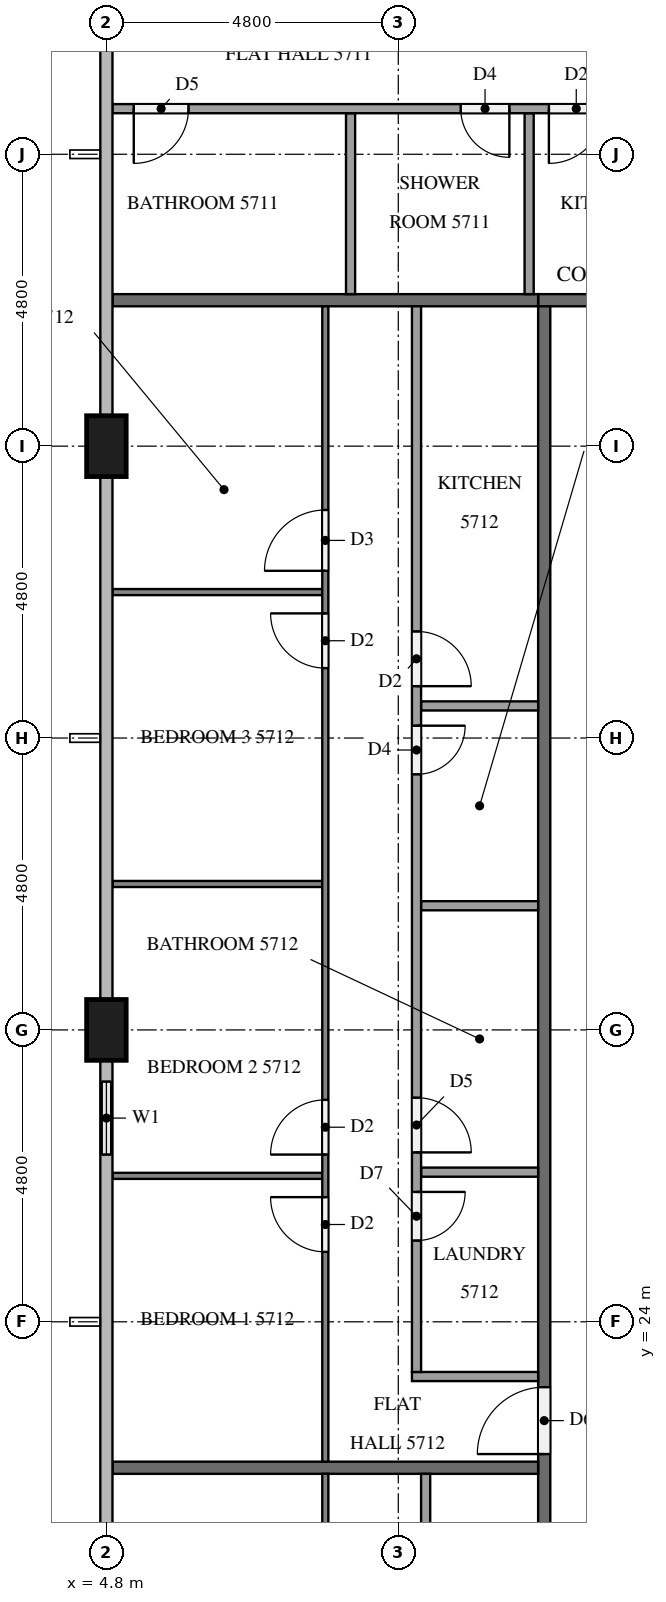
"""IFC4 building model, lengths in metres.
Left out: names, types, materials, properties, quantities, classifications, styles, units other than length and angle.
Written with IfcOpenShell. Run it as: python <this file> out.ifc"""

import sys

from ifc_helpers import new_model, si_unit, direction, frame, frame_2d, origin, origin_2d, place, context, subcontext, project, spatial, rectangle, extrude, element, fill, save


model = new_model("IFC4")
c1 = context("Model", 3, precision=1e-05, world=origin(), true_north=direction((0.0, 1.0)))
c2 = subcontext(c1, "Body", "Model", "MODEL_VIEW")
j1 = project(units=[si_unit("LENGTHUNIT", "METRE"), si_unit("PLANEANGLEUNIT", "RADIAN")], contexts=[c1])
p1 = place(None, origin())
s1 = spatial("IfcSite", under=j1, at=p1, CompositionType="ELEMENT")
p2 = place(p1, origin())
s2 = spatial("IfcBuilding", under=s1, at=p2, CompositionType="ELEMENT")
p3 = place(p2, frame((0.0, 0.0, 219.3)))
s3 = spatial("IfcBuildingStorey", under=s2, at=p3, CompositionType="ELEMENT", Elevation=219.3)
for number, where, z_axis, x_axis in (
    (1, (4.8, 38.4, 0.0), (0.0, 0.0, 1.0), (0.0, 1.0, 0.0)),
    (2, (4.8, 28.8, 0.0), (0.0, 0.0, 1.0), (0.0, 1.0, 0.0)),
):
    element("IfcColumn", number, at=place(p3, frame(where, z_axis=z_axis, x_axis=x_axis)), inside=s3, PredefinedType="COLUMN", context=c2, shape_type="SweptSolid", body=[
        extrude(rectangle(XDim=1.0, YDim=0.65, at=origin_2d()), origin(), (0.0, 0.0, 1.0), 3.2),
    ])
p4 = place(p3, frame((4.8, 28.3, 0.0), z_axis=(0.0, 0.0, 1.0), x_axis=(0.0, -1.0, 0.0)))
e3 = element("IfcWall", 3, at=p4, inside=s3, PredefinedType="SOLIDWALL", context=c2, shape_type="SweptSolid", body=[
    extrude(rectangle(XDim=1.9, YDim=0.15, at=frame_2d((0.95, 0.0))), origin(), (0.0, 0.0, 1.0), 3.2),
])
p5 = place(p4, frame((0.35, 0.0, 0.9)))
e4 = element("IfcOpeningElement", 4, at=p5, cuts=e3, PredefinedType="OPENING", context=c2, shape_type="SweptSolid", body=[
    extrude(rectangle(XDim=1.2, YDim=1.4, at=frame_2d((0.6, 0.7))), frame((0.0, 0.085, 0.0), z_axis=(0.0, -1.0, 0.0), x_axis=(1.0, 0.0, 0.0)), (0.0, 0.0, 1.0), 0.17),
])
p6 = place(p3, frame((11.9, 40.8, 0.0), z_axis=(0.0, 0.0, 1.0), x_axis=(1.0, 0.0, 0.0)))
e5 = element("IfcWall", 5, at=p6, inside=s3, PredefinedType="PARTITIONING", context=c2, shape_type="SweptSolid", body=[
    extrude(rectangle(XDim=38.6, YDim=0.2, at=frame_2d((19.3, 0.0))), origin(), (0.0, 0.0, 1.0), 3.2),
])
p7 = place(p6, frame((33.975, 0.0, 0.0)))
e6 = element("IfcOpeningElement", 6, at=p7, cuts=e5, PredefinedType="OPENING", context=c2, shape_type="SweptSolid", body=[
    extrude(rectangle(XDim=1.0, YDim=2.1, at=frame_2d((0.5, 1.05))), frame((0.0, 0.11, 0.0), z_axis=(0.0, -1.0, 0.0), x_axis=(1.0, 0.0, 0.0)), (0.0, 0.0, 1.0), 0.22),
])
p8 = place(p6, frame((14.725, 0.0, 0.0)))
e7 = element("IfcOpeningElement", 7, at=p8, cuts=e5, PredefinedType="OPENING", context=c2, shape_type="SweptSolid", body=[
    extrude(rectangle(XDim=1.1, YDim=2.1, at=frame_2d((0.55, 1.05))), frame((0.0, 0.11, 0.0), z_axis=(0.0, -1.0, 0.0), x_axis=(1.0, 0.0, 0.0)), (0.0, 0.0, 1.0), 0.22),
])
p9 = place(p6, frame((7.575, 0.0, 0.0)))
e8 = element("IfcOpeningElement", 8, at=p9, cuts=e5, PredefinedType="OPENING", context=c2, shape_type="SweptSolid", body=[
    extrude(rectangle(XDim=1.0, YDim=2.1, at=frame_2d((0.5, 1.05))), frame((0.0, 0.11, 0.0), z_axis=(0.0, -1.0, 0.0), x_axis=(1.0, 0.0, 0.0)), (0.0, 0.0, 1.0), 0.22),
])
p10 = place(p6, frame((6.025, 0.0, 0.0)))
e9 = element("IfcOpeningElement", 9, at=p10, cuts=e5, PredefinedType="OPENING", context=c2, shape_type="SweptSolid", body=[
    extrude(rectangle(XDim=1.0, YDim=2.1, at=frame_2d((0.5, 1.05))), frame((0.0, 0.11, 0.0), z_axis=(0.0, -1.0, 0.0), x_axis=(1.0, 0.0, 0.0)), (0.0, 0.0, 1.0), 0.22),
])
p11 = place(p3, frame((12.0, 12.1, 0.0), z_axis=(0.0, 0.0, 1.0), x_axis=(0.0, 1.0, 0.0)))
e10 = element("IfcWall", 10, at=p11, inside=s3, PredefinedType="PARTITIONING", context=c2, shape_type="SweptSolid", body=[
    extrude(rectangle(XDim=28.6, YDim=0.2, at=frame_2d((14.3, 0.0))), origin(), (0.0, 0.0, 1.0), 3.2),
])
p12 = place(p11, frame((9.725, 0.0, 0.0)))
e11 = element("IfcOpeningElement", 11, at=p12, cuts=e10, PredefinedType="OPENING", context=c2, shape_type="SweptSolid", body=[
    extrude(rectangle(XDim=1.1, YDim=2.1, at=frame_2d((0.55, 1.05))), frame((0.0, 0.11, 0.0), z_axis=(0.0, -1.0, 0.0), x_axis=(1.0, 0.0, 0.0)), (0.0, 0.0, 1.0), 0.22),
])
p13 = place(p11, frame((0.175, 0.0, 0.0)))
e12 = element("IfcOpeningElement", 12, at=p13, cuts=e10, PredefinedType="OPENING", context=c2, shape_type="SweptSolid", body=[
    extrude(rectangle(XDim=1.0, YDim=2.1, at=frame_2d((0.5, 1.05))), frame((0.0, 0.11, 0.0), z_axis=(0.0, -1.0, 0.0), x_axis=(1.0, 0.0, 0.0)), (0.0, 0.0, 1.0), 0.22),
])
for number, where, z_axis, x_axis in (
    (13, (4.9, 40.8, 0.0), (0.0, 0.0, 1.0), (1.0, 0.0, 0.0)),
    (14, (4.9, 21.6, 0.0), (0.0, 0.0, 1.0), (1.0, 0.0, 0.0)),
):
    element("IfcWall", number, at=place(p3, frame(where, z_axis=z_axis, x_axis=x_axis)), inside=s3, PredefinedType="PARTITIONING", context=c2, shape_type="SweptSolid", body=[
        extrude(rectangle(XDim=7.0, YDim=0.2, at=frame_2d((3.5, 0.0))), origin(), (0.0, 0.0, 1.0), 3.2),
    ])
for number, where, z_axis, x_axis in (
    (15, (11.752, 40.9, 0.0), (0.0, 0.0, 1.0), (0.0, 1.0, 0.0)),
    (16, (8.815, 40.9, 0.0), (0.0, 0.0, 1.0), (0.0, 1.0, 0.0)),
):
    element("IfcWall", number, at=place(p3, frame(where, z_axis=z_axis, x_axis=x_axis)), inside=s3, PredefinedType="PARTITIONING", context=c2, shape_type="SweptSolid", body=[
        extrude(rectangle(XDim=2.975, YDim=0.15, at=frame_2d((1.488, 0.0))), origin(), (0.0, 0.0, 1.0), 3.2),
    ])
p14 = place(p3, frame((17.625, 43.95, 0.0), z_axis=(0.0, 0.0, 1.0), x_axis=(-1.0, 0.0, 0.0)))
e17 = element("IfcWall", 17, at=p14, inside=s3, PredefinedType="PARTITIONING", context=c2, shape_type="SweptSolid", body=[
    extrude(rectangle(XDim=12.725, YDim=0.15, at=frame_2d((6.363, 0.0))), origin(), (0.0, 0.0, 1.0), 3.2),
])
p15 = place(p14, frame((4.648, 0.0, 0.0)))
e18 = element("IfcOpeningElement", 18, at=p15, cuts=e17, PredefinedType="OPENING", context=c2, shape_type="SweptSolid", body=[
    extrude(rectangle(XDim=0.9, YDim=2.1, at=frame_2d((0.45, 1.05))), frame((0.0, 0.085, 0.0), z_axis=(0.0, -1.0, 0.0), x_axis=(1.0, 0.0, 0.0)), (0.0, 0.0, 1.0), 0.17),
])
p16 = place(p14, frame((6.198, 0.0, 0.0)))
e19 = element("IfcOpeningElement", 19, at=p16, cuts=e17, PredefinedType="OPENING", context=c2, shape_type="SweptSolid", body=[
    extrude(rectangle(XDim=0.8, YDim=2.1, at=frame_2d((0.4, 1.05))), frame((0.0, 0.085, 0.0), z_axis=(0.0, -1.0, 0.0), x_axis=(1.0, 0.0, 0.0)), (0.0, 0.0, 1.0), 0.17),
])
p17 = place(p14, frame((11.475, 0.0, 0.0)))
e20 = element("IfcOpeningElement", 20, at=p17, cuts=e17, PredefinedType="OPENING", context=c2, shape_type="SweptSolid", body=[
    extrude(rectangle(XDim=0.9, YDim=2.1, at=frame_2d((0.45, 1.05))), frame((0.0, 0.085, 0.0), z_axis=(0.0, -1.0, 0.0), x_axis=(1.0, 0.0, 0.0)), (0.0, 0.0, 1.0), 0.17),
])
for number, where, z_axis, x_axis in (
    (21, (8.35, 26.4, 0.0), (0.0, 0.0, 1.0), (-1.0, 0.0, 0.0)),
    (22, (8.35, 31.2, 0.0), (0.0, 0.0, 1.0), (-1.0, 0.0, 0.0)),
    (23, (8.35, 36.0, 0.0), (0.0, 0.0, 1.0), (-1.0, 0.0, 0.0)),
):
    element("IfcWall", number, at=place(p3, frame(where, z_axis=z_axis, x_axis=x_axis)), inside=s3, PredefinedType="PARTITIONING", context=c2, shape_type="SweptSolid", body=[
        extrude(rectangle(XDim=3.45, YDim=0.1, at=frame_2d((1.725, 0.0))), origin(), (0.0, 0.0, 1.0), 3.2),
    ])
p18 = place(p3, frame((8.4, 21.7, 0.0), z_axis=(0.0, 0.0, 1.0), x_axis=(0.0, 1.0, 0.0)))
e24 = element("IfcWall", 24, at=p18, inside=s3, PredefinedType="PARTITIONING", context=c2, shape_type="SweptSolid", body=[
    extrude(rectangle(XDim=19.0, YDim=0.1, at=frame_2d((9.5, 0.0))), origin(), (0.0, 0.0, 1.0), 3.2),
])
p19 = place(p18, frame((3.45, 0.0, 0.0)))
e25 = element("IfcOpeningElement", 25, at=p19, cuts=e24, PredefinedType="OPENING", context=c2, shape_type="SweptSolid", body=[
    extrude(rectangle(XDim=0.9, YDim=2.1, at=frame_2d((0.45, 1.05))), frame((0.0, 0.06, 0.0), z_axis=(0.0, -1.0, 0.0), x_axis=(1.0, 0.0, 0.0)), (0.0, 0.0, 1.0), 0.12),
])
p20 = place(p18, frame((5.05, 0.0, 0.0)))
e26 = element("IfcOpeningElement", 26, at=p20, cuts=e24, PredefinedType="OPENING", context=c2, shape_type="SweptSolid", body=[
    extrude(rectangle(XDim=0.9, YDim=2.1, at=frame_2d((0.45, 1.05))), frame((0.0, 0.06, 0.0), z_axis=(0.0, -1.0, 0.0), x_axis=(1.0, 0.0, 0.0)), (0.0, 0.0, 1.0), 0.12),
])
p21 = place(p18, frame((13.05, 0.0, 0.0)))
e27 = element("IfcOpeningElement", 27, at=p21, cuts=e24, PredefinedType="OPENING", context=c2, shape_type="SweptSolid", body=[
    extrude(rectangle(XDim=0.9, YDim=2.1, at=frame_2d((0.45, 1.05))), frame((0.0, 0.06, 0.0), z_axis=(0.0, -1.0, 0.0), x_axis=(1.0, 0.0, 0.0)), (0.0, 0.0, 1.0), 0.12),
])
p22 = place(p18, frame((14.65, 0.0, 0.0)))
e28 = element("IfcOpeningElement", 28, at=p22, cuts=e24, PredefinedType="OPENING", context=c2, shape_type="SweptSolid", body=[
    extrude(rectangle(XDim=1.0, YDim=2.1, at=frame_2d((0.5, 1.05))), frame((0.0, 0.06, 0.0), z_axis=(0.0, -1.0, 0.0), x_axis=(1.0, 0.0, 0.0)), (0.0, 0.0, 1.0), 0.12),
])
for number, where, z_axis, x_axis in (
    (29, (11.9, 26.461, 0.0), (0.0, 0.0, 1.0), (-1.0, 0.0, 0.0)),
    (30, (11.9, 30.842, 0.0), (0.0, 0.0, 1.0), (-1.0, 0.0, 0.0)),
    (31, (11.9, 34.128, 0.0), (0.0, 0.0, 1.0), (-1.0, 0.0, 0.0)),
):
    element("IfcWall", number, at=place(p3, frame(where, z_axis=z_axis, x_axis=x_axis)), inside=s3, PredefinedType="PARTITIONING", context=c2, shape_type="SweptSolid", body=[
        extrude(rectangle(XDim=1.925, YDim=0.15, at=frame_2d((0.962, 0.0))), origin(), (0.0, 0.0, 1.0), 3.2),
    ])
p23 = place(p3, frame((11.9, 23.1, 0.0), z_axis=(0.0, 0.0, 1.0), x_axis=(-1.0, 0.0, 0.0)))
e32 = element("IfcWall", 32, at=p23, inside=s3, PredefinedType="PARTITIONING", context=c2, shape_type="SweptSolid", body=[
    extrude(rectangle(XDim=2.075, YDim=0.15, at=frame_2d((1.038, 0.0))), origin(), (0.0, 0.0, 1.0), 3.2),
])
p24 = place(p3, frame((9.9, 40.7, 0.0), z_axis=(0.0, 0.0, 1.0), x_axis=(0.0, -1.0, 0.0)))
e33 = element("IfcWall", 33, at=p24, inside=s3, PredefinedType="PARTITIONING", context=c2, shape_type="SweptSolid", body=[
    extrude(rectangle(XDim=17.525, YDim=0.15, at=frame_2d((8.762, 0.0))), origin(), (0.0, 0.0, 1.0), 3.2),
])
p25 = place(p24, frame((14.564, 0.0, 0.0)))
e34 = element("IfcOpeningElement", 34, at=p25, cuts=e33, PredefinedType="OPENING", context=c2, shape_type="SweptSolid", body=[
    extrude(rectangle(XDim=0.8, YDim=2.1, at=frame_2d((0.4, 1.05))), frame((0.0, 0.085, 0.0), z_axis=(0.0, -1.0, 0.0), x_axis=(1.0, 0.0, 0.0)), (0.0, 0.0, 1.0), 0.17),
])
p26 = place(p24, frame((13.014, 0.0, 0.0)))
e35 = element("IfcOpeningElement", 35, at=p26, cuts=e33, PredefinedType="OPENING", context=c2, shape_type="SweptSolid", body=[
    extrude(rectangle(XDim=0.9, YDim=2.1, at=frame_2d((0.45, 1.05))), frame((0.0, 0.085, 0.0), z_axis=(0.0, -1.0, 0.0), x_axis=(1.0, 0.0, 0.0)), (0.0, 0.0, 1.0), 0.17),
])
p27 = place(p24, frame((6.897, 0.0, 0.0)))
e36 = element("IfcOpeningElement", 36, at=p27, cuts=e33, PredefinedType="OPENING", context=c2, shape_type="SweptSolid", body=[
    extrude(rectangle(XDim=0.8, YDim=2.1, at=frame_2d((0.4, 1.05))), frame((0.0, 0.085, 0.0), z_axis=(0.0, -1.0, 0.0), x_axis=(1.0, 0.0, 0.0)), (0.0, 0.0, 1.0), 0.17),
])
p28 = place(p24, frame((5.347, 0.0, 0.0)))
e37 = element("IfcOpeningElement", 37, at=p28, cuts=e33, PredefinedType="OPENING", context=c2, shape_type="SweptSolid", body=[
    extrude(rectangle(XDim=0.9, YDim=2.1, at=frame_2d((0.45, 1.05))), frame((0.0, 0.085, 0.0), z_axis=(0.0, -1.0, 0.0), x_axis=(1.0, 0.0, 0.0)), (0.0, 0.0, 1.0), 0.17),
])
p29 = place(p3, frame((8.4, 12.1, 0.0), z_axis=(0.0, 0.0, 1.0), x_axis=(0.0, 1.0, 0.0)))
e38 = element("IfcWall", 38, at=p29, inside=s3, PredefinedType="PARTITIONING", context=c2, shape_type="SweptSolid", body=[
    extrude(rectangle(XDim=9.4, YDim=0.1, at=frame_2d((4.7, 0.0))), origin(), (0.0, 0.0, 1.0), 3.2),
])
p30 = place(p29, frame((3.35, 0.0, 0.0)))
e39 = element("IfcOpeningElement", 39, at=p30, cuts=e38, PredefinedType="OPENING", context=c2, shape_type="SweptSolid", body=[
    extrude(rectangle(XDim=1.0, YDim=2.1, at=frame_2d((0.5, 1.05))), frame((0.0, 0.06, 0.0), z_axis=(0.0, -1.0, 0.0), x_axis=(1.0, 0.0, 0.0)), (0.0, 0.0, 1.0), 0.12),
])
p31 = place(p29, frame((5.05, 0.0, 0.0)))
e40 = element("IfcOpeningElement", 40, at=p31, cuts=e38, PredefinedType="OPENING", context=c2, shape_type="SweptSolid", body=[
    extrude(rectangle(XDim=0.9, YDim=2.1, at=frame_2d((0.45, 1.05))), frame((0.0, 0.06, 0.0), z_axis=(0.0, -1.0, 0.0), x_axis=(1.0, 0.0, 0.0)), (0.0, 0.0, 1.0), 0.12),
])
p32 = place(p3, frame((10.05, 21.5, 0.0), z_axis=(0.0, 0.0, 1.0), x_axis=(0.0, -1.0, 0.0)))
e41 = element("IfcWall", 41, at=p32, inside=s3, PredefinedType="PARTITIONING", context=c2, shape_type="SweptSolid", body=[
    extrude(rectangle(XDim=7.925, YDim=0.15, at=frame_2d((3.962, 0.0))), origin(), (0.0, 0.0, 1.0), 3.2),
])
p33 = place(p32, frame((5.08, 0.0, 0.0)))
e42 = element("IfcOpeningElement", 42, at=p33, cuts=e41, PredefinedType="OPENING", context=c2, shape_type="SweptSolid", body=[
    extrude(rectangle(XDim=0.8, YDim=2.1, at=frame_2d((0.4, 1.05))), frame((0.0, 0.085, 0.0), z_axis=(0.0, -1.0, 0.0), x_axis=(1.0, 0.0, 0.0)), (0.0, 0.0, 1.0), 0.17),
])
p34 = place(p32, frame((3.53, 0.0, 0.0)))
e43 = element("IfcOpeningElement", 43, at=p34, cuts=e41, PredefinedType="OPENING", context=c2, shape_type="SweptSolid", body=[
    extrude(rectangle(XDim=0.9, YDim=2.1, at=frame_2d((0.45, 1.05))), frame((0.0, 0.085, 0.0), z_axis=(0.0, -1.0, 0.0), x_axis=(1.0, 0.0, 0.0)), (0.0, 0.0, 1.0), 0.17),
])
p35 = place(p5, origin())
e44 = element("IfcWindow", 44, at=p35, inside=s3, PartitioningType="SINGLE_PANEL", PredefinedType="WINDOW", context=c2, shape_type="SweptSolid", body=[
    extrude(rectangle(XDim=1.2, YDim=1.4, at=frame_2d((0.6, 0.7))), frame((0.0, 0.03, 0.0), z_axis=(0.0, -1.0, 0.0), x_axis=(1.0, 0.0, 0.0)), (0.0, 0.0, 1.0), 0.06),
])
fill(e4, e44)
p36 = place(p12, origin())
e45 = element("IfcDoor", 45, at=p36, inside=s3, OperationType="SINGLE_SWING_LEFT", PredefinedType="DOOR", context=c2, shape_type="SweptSolid", body=[
    extrude(rectangle(XDim=1.1, YDim=2.1, at=frame_2d((0.55, 1.05))), frame((0.0, 0.025, 0.0), z_axis=(0.0, -1.0, 0.0), x_axis=(1.0, 0.0, 0.0)), (0.0, 0.0, 1.0), 0.05),
])
fill(e11, e45)
p37 = place(p15, origin())
e46 = element("IfcDoor", 46, at=p37, inside=s3, OperationType="SINGLE_SWING_RIGHT", PredefinedType="DOOR", context=c2, shape_type="SweptSolid", body=[
    extrude(rectangle(XDim=0.9, YDim=2.1, at=frame_2d((0.45, 1.05))), frame((0.0, 0.025, 0.0), z_axis=(0.0, -1.0, 0.0), x_axis=(1.0, 0.0, 0.0)), (0.0, 0.0, 1.0), 0.05),
])
fill(e18, e46)
p38 = place(p16, origin())
e47 = element("IfcDoor", 47, at=p38, inside=s3, OperationType="SINGLE_SWING_LEFT", PredefinedType="DOOR", context=c2, shape_type="SweptSolid", body=[
    extrude(rectangle(XDim=0.8, YDim=2.1, at=frame_2d((0.4, 1.05))), frame((0.0, 0.025, 0.0), z_axis=(0.0, -1.0, 0.0), x_axis=(1.0, 0.0, 0.0)), (0.0, 0.0, 1.0), 0.05),
])
fill(e19, e47)
p39 = place(p17, origin())
e48 = element("IfcDoor", 48, at=p39, inside=s3, OperationType="SINGLE_SWING_RIGHT", PredefinedType="DOOR", context=c2, shape_type="SweptSolid", body=[
    extrude(rectangle(XDim=0.9, YDim=2.1, at=frame_2d((0.45, 1.05))), frame((0.0, 0.025, 0.0), z_axis=(0.0, -1.0, 0.0), x_axis=(1.0, 0.0, 0.0)), (0.0, 0.0, 1.0), 0.05),
])
fill(e20, e48)
p40 = place(p19, origin())
e49 = element("IfcDoor", 49, at=p40, inside=s3, OperationType="SINGLE_SWING_RIGHT", PredefinedType="DOOR", context=c2, shape_type="SweptSolid", body=[
    extrude(rectangle(XDim=0.9, YDim=2.1, at=frame_2d((0.45, 1.05))), frame((0.0, 0.025, 0.0), z_axis=(0.0, -1.0, 0.0), x_axis=(1.0, 0.0, 0.0)), (0.0, 0.0, 1.0), 0.05),
])
fill(e25, e49)
p41 = place(p20, origin())
e50 = element("IfcDoor", 50, at=p41, inside=s3, OperationType="SINGLE_SWING_LEFT", PredefinedType="DOOR", context=c2, shape_type="SweptSolid", body=[
    extrude(rectangle(XDim=0.9, YDim=2.1, at=frame_2d((0.45, 1.05))), frame((0.0, 0.025, 0.0), z_axis=(0.0, -1.0, 0.0), x_axis=(1.0, 0.0, 0.0)), (0.0, 0.0, 1.0), 0.05),
])
fill(e26, e50)
p42 = place(p21, origin())
e51 = element("IfcDoor", 51, at=p42, inside=s3, OperationType="SINGLE_SWING_RIGHT", PredefinedType="DOOR", context=c2, shape_type="SweptSolid", body=[
    extrude(rectangle(XDim=0.9, YDim=2.1, at=frame_2d((0.45, 1.05))), frame((0.0, 0.025, 0.0), z_axis=(0.0, -1.0, 0.0), x_axis=(1.0, 0.0, 0.0)), (0.0, 0.0, 1.0), 0.05),
])
fill(e27, e51)
p43 = place(p22, origin())
e52 = element("IfcDoor", 52, at=p43, inside=s3, OperationType="SINGLE_SWING_LEFT", PredefinedType="DOOR", context=c2, shape_type="SweptSolid", body=[
    extrude(rectangle(XDim=1.0, YDim=2.1, at=frame_2d((0.5, 1.05))), frame((0.0, 0.025, 0.0), z_axis=(0.0, -1.0, 0.0), x_axis=(1.0, 0.0, 0.0)), (0.0, 0.0, 1.0), 0.05),
])
fill(e28, e52)
p44 = place(p25, origin())
e53 = element("IfcDoor", 53, at=p44, inside=s3, OperationType="SINGLE_SWING_LEFT", PredefinedType="DOOR", context=c2, shape_type="SweptSolid", body=[
    extrude(rectangle(XDim=0.8, YDim=2.1, at=frame_2d((0.4, 1.05))), frame((0.0, 0.025, 0.0), z_axis=(0.0, -1.0, 0.0), x_axis=(1.0, 0.0, 0.0)), (0.0, 0.0, 1.0), 0.05),
])
fill(e34, e53)
p45 = place(p26, origin())
e54 = element("IfcDoor", 54, at=p45, inside=s3, OperationType="SINGLE_SWING_RIGHT", PredefinedType="DOOR", context=c2, shape_type="SweptSolid", body=[
    extrude(rectangle(XDim=0.9, YDim=2.1, at=frame_2d((0.45, 1.05))), frame((0.0, 0.025, 0.0), z_axis=(0.0, -1.0, 0.0), x_axis=(1.0, 0.0, 0.0)), (0.0, 0.0, 1.0), 0.05),
])
fill(e35, e54)
p46 = place(p27, origin())
e55 = element("IfcDoor", 55, at=p46, inside=s3, OperationType="SINGLE_SWING_LEFT", PredefinedType="DOOR", context=c2, shape_type="SweptSolid", body=[
    extrude(rectangle(XDim=0.8, YDim=2.1, at=frame_2d((0.4, 1.05))), frame((0.0, 0.025, 0.0), z_axis=(0.0, -1.0, 0.0), x_axis=(1.0, 0.0, 0.0)), (0.0, 0.0, 1.0), 0.05),
])
fill(e36, e55)
p47 = place(p28, origin())
e56 = element("IfcDoor", 56, at=p47, inside=s3, OperationType="SINGLE_SWING_RIGHT", PredefinedType="DOOR", context=c2, shape_type="SweptSolid", body=[
    extrude(rectangle(XDim=0.9, YDim=2.1, at=frame_2d((0.45, 1.05))), frame((0.0, 0.025, 0.0), z_axis=(0.0, -1.0, 0.0), x_axis=(1.0, 0.0, 0.0)), (0.0, 0.0, 1.0), 0.05),
])
fill(e37, e56)
save(model, sys.argv[1])
